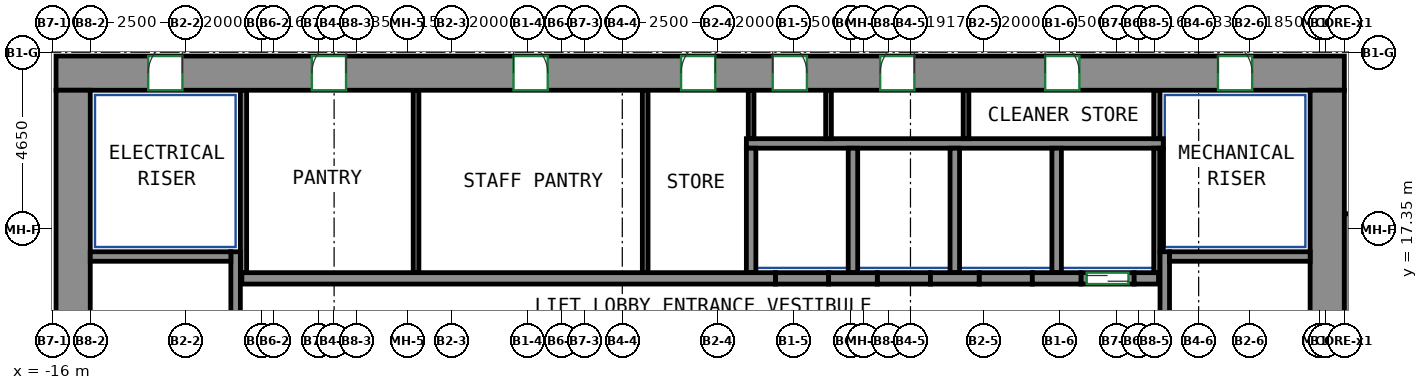
"""IFC4 building model, lengths in metres.
Left out: names, types, materials, properties, quantities, classifications, styles, units other than length and angle.
Written with IfcOpenShell. Run it as: python <this file> out.ifc"""

import sys

from ifc_helpers import new_model, si_unit, direction, frame, frame_2d, origin, place, context, subcontext, project, spatial, rectangle, extrude, source, transform, mapped, element, fill, save


model = new_model("IFC4")
c1 = context("Model", 3, precision=1e-05, world=origin(), true_north=direction((0.0, 1.0)))
c2 = subcontext(c1, "Body", "Model", "MODEL_VIEW")
j1 = project(units=[si_unit("LENGTHUNIT", "METRE"), si_unit("PLANEANGLEUNIT", "RADIAN")], contexts=[c1])
p1 = place(None, origin())
s1 = spatial("IfcSite", under=j1, at=p1, CompositionType="ELEMENT")
p2 = place(p1, origin())
s2 = spatial("IfcBuilding", under=s1, at=p2, CompositionType="ELEMENT")
p3 = place(p2, frame((0.0, 0.0, 150.7)))
s3 = spatial("IfcBuildingStorey", under=s2, at=p3, CompositionType="ELEMENT", Elevation=150.7)
m1 = source(origin(), c2, "Body", "SweptSolid", [
    extrude(rectangle(XDim=33.9, YDim=0.9, at=frame_2d((16.95, 0.0))), origin(), (0.0, 0.0, 1.0), 3.12),
])
p4 = place(p3, frame((-15.9, 21.45, 0.0), z_axis=(0.0, 0.0, 1.0), x_axis=(1.0, 0.0, 0.0)))
e1 = element("IfcWall", 1, at=p4, inside=s3, PredefinedType="SHEAR", context=c2, shape_type="MappedRepresentation", body=[
    mapped(m1, transform((0.0, 0.0, 0.0))),
])
p5 = place(p4, frame((6.731, 0.0, 0.0)))
e2 = element("IfcOpeningElement", 2, at=p5, cuts=e1, PredefinedType="OPENING", context=c2, shape_type="SweptSolid", body=[
    extrude(rectangle(XDim=0.9, YDim=2.1, at=frame_2d((0.45, 1.05))), frame((0.0, 0.46, 0.0), z_axis=(0.0, -1.0, 0.0), x_axis=(1.0, 0.0, 0.0)), (0.0, 0.0, 1.0), 0.92),
])
p6 = place(p4, frame((12.038, 0.0, 0.0)))
e3 = element("IfcOpeningElement", 3, at=p6, cuts=e1, PredefinedType="OPENING", context=c2, shape_type="SweptSolid", body=[
    extrude(rectangle(XDim=0.9, YDim=2.1, at=frame_2d((0.45, 1.05))), frame((0.0, 0.46, 0.0), z_axis=(0.0, -1.0, 0.0), x_axis=(1.0, 0.0, 0.0)), (0.0, 0.0, 1.0), 0.92),
])
p7 = place(p4, frame((16.446, 0.0, 0.0)))
e4 = element("IfcOpeningElement", 4, at=p7, cuts=e1, PredefinedType="OPENING", context=c2, shape_type="SweptSolid", body=[
    extrude(rectangle(XDim=0.9, YDim=2.1, at=frame_2d((0.45, 1.05))), frame((0.0, 0.46, 0.0), z_axis=(0.0, -1.0, 0.0), x_axis=(1.0, 0.0, 0.0)), (0.0, 0.0, 1.0), 0.92),
])
p8 = place(p4, frame((18.858, 0.0, 0.0)))
e5 = element("IfcOpeningElement", 5, at=p8, cuts=e1, PredefinedType="OPENING", context=c2, shape_type="SweptSolid", body=[
    extrude(rectangle(XDim=0.9, YDim=2.1, at=frame_2d((0.45, 1.05))), frame((0.0, 0.46, 0.0), z_axis=(0.0, -1.0, 0.0), x_axis=(1.0, 0.0, 0.0)), (0.0, 0.0, 1.0), 0.92),
])
p9 = place(p4, frame((21.686, 0.0, 0.0)))
e6 = element("IfcOpeningElement", 6, at=p9, cuts=e1, PredefinedType="OPENING", context=c2, shape_type="SweptSolid", body=[
    extrude(rectangle(XDim=0.9, YDim=2.1, at=frame_2d((0.45, 1.05))), frame((0.0, 0.46, 0.0), z_axis=(0.0, -1.0, 0.0), x_axis=(1.0, 0.0, 0.0)), (0.0, 0.0, 1.0), 0.92),
])
p10 = place(p4, frame((26.027, 0.0, 0.0)))
e7 = element("IfcOpeningElement", 7, at=p10, cuts=e1, PredefinedType="OPENING", context=c2, shape_type="SweptSolid", body=[
    extrude(rectangle(XDim=0.9, YDim=2.1, at=frame_2d((0.45, 1.05))), frame((0.0, 0.46, 0.0), z_axis=(0.0, -1.0, 0.0), x_axis=(1.0, 0.0, 0.0)), (0.0, 0.0, 1.0), 0.92),
])
p11 = place(p4, frame((2.425, 0.0, 0.0)))
e8 = element("IfcOpeningElement", 8, at=p11, cuts=e1, PredefinedType="OPENING", context=c2, shape_type="SweptSolid", body=[
    extrude(rectangle(XDim=0.9, YDim=2.1, at=frame_2d((0.45, 1.05))), frame((0.0, 0.46, 0.0), z_axis=(0.0, -1.0, 0.0), x_axis=(1.0, 0.0, 0.0)), (0.0, 0.0, 1.0), 0.92),
])
p12 = place(p4, frame((30.575, 0.0, 0.0)))
e9 = element("IfcOpeningElement", 9, at=p12, cuts=e1, PredefinedType="OPENING", context=c2, shape_type="SweptSolid", body=[
    extrude(rectangle(XDim=0.9, YDim=2.1, at=frame_2d((0.45, 1.05))), frame((0.0, 0.46, 0.0), z_axis=(0.0, -1.0, 0.0), x_axis=(1.0, 0.0, 0.0)), (0.0, 0.0, 1.0), 0.92),
])
m2 = source(origin(), c2, "Body", "SweptSolid", [
    extrude(rectangle(XDim=12.0, YDim=0.9, at=frame_2d((6.0, 0.0))), origin(), (0.0, 0.0, 1.0), 3.12),
])
for number, where, z_axis, x_axis in (
    (10, (-15.45, 9.0, 0.0), (0.0, 0.0, 1.0), (0.0, 1.0, 0.0)),
    (11, (17.55, 9.0, 0.0), (0.0, 0.0, 1.0), (0.0, 1.0, 0.0)),
):
    element("IfcWall", number, at=place(p3, frame(where, z_axis=z_axis, x_axis=x_axis)), inside=s3, PredefinedType="SHEAR", context=c2, shape_type="MappedRepresentation", body=[
        mapped(m2, transform((0.0, 0.0, 0.0))),
    ])
m3 = source(origin(), c2, "Body", "SweptSolid", [
    extrude(rectangle(XDim=7.75, YDim=0.25, at=frame_2d((3.875, 0.0))), origin(), (0.0, 0.0, 1.0), 3.12),
])
p13 = place(p3, frame((-11.175, 9.0, 0.0), z_axis=(0.0, 0.0, 1.0), x_axis=(0.0, 1.0, 0.0)))
e12 = element("IfcWall", 12, at=p13, inside=s3, PredefinedType="SHEAR", context=c2, shape_type="MappedRepresentation", body=[
    mapped(m3, transform((0.0, 0.0, 0.0))),
])
m4 = source(origin(), c2, "Body", "SweptSolid", [
    extrude(rectangle(XDim=3.7, YDim=0.25, at=frame_2d((1.85, 0.0))), origin(), (0.0, 0.0, 1.0), 3.12),
])
p14 = place(p3, frame((-15.0, 16.625, 0.0), z_axis=(0.0, 0.0, 1.0), x_axis=(1.0, 0.0, 0.0)))
e13 = element("IfcWall", 13, at=p14, inside=s3, PredefinedType="SHEAR", context=c2, shape_type="MappedRepresentation", body=[
    mapped(m4, transform((0.0, 0.0, 0.0))),
])
p15 = place(p3, frame((13.275, 9.0, 0.0), z_axis=(0.0, 0.0, 1.0), x_axis=(0.0, 1.0, 0.0)))
e14 = element("IfcWall", 14, at=p15, inside=s3, PredefinedType="SHEAR", context=c2, shape_type="MappedRepresentation", body=[
    mapped(m3, transform((0.0, 0.0, 0.0))),
])
m5 = source(origin(), c2, "Body", "SweptSolid", [
    extrude(rectangle(XDim=3.7, YDim=0.25, at=frame_2d((1.85, 0.0))), origin(), (0.0, 0.0, 1.0), 3.12),
])
p16 = place(p3, frame((13.4, 16.625, 0.0), z_axis=(0.0, 0.0, 1.0), x_axis=(1.0, 0.0, 0.0)))
e15 = element("IfcWall", 15, at=p16, inside=s3, PredefinedType="SHEAR", context=c2, shape_type="MappedRepresentation", body=[
    mapped(m5, transform((0.0, 0.0, 0.0))),
])
m6 = source(origin(), c2, "Body", "SweptSolid", [
    extrude(rectangle(XDim=8.0, YDim=0.35, at=frame_2d((4.0, 0.0))), origin(), (0.0, 0.0, 1.0), 3.12),
])
p17 = place(p3, frame((18.175, 9.75, 0.0), z_axis=(0.0, 0.0, 1.0), x_axis=(0.0, 1.0, 0.0)))
e16 = element("IfcWall", 16, at=p17, inside=s3, PredefinedType="SHEAR", context=c2, shape_type="MappedRepresentation", body=[
    mapped(m6, transform((0.0, 0.0, 0.0))),
])
m7 = source(origin(), c2, "Body", "SweptSolid", [
    extrude(rectangle(XDim=14.04, YDim=0.3, at=frame_2d((7.02, 0.0))), origin(), (0.0, 0.0, 1.0), 3.12),
])
p18 = place(p3, frame((-11.01, 16.05, 0.0), z_axis=(0.0, 0.0, 1.0), x_axis=(1.0, 0.0, 0.0)))
e17 = element("IfcWall", 17, at=p18, inside=s3, PredefinedType="SHEAR", context=c2, shape_type="MappedRepresentation", body=[
    mapped(m7, transform((0.0, 0.0, 0.0))),
])
m8 = source(origin(), c2, "Body", "SweptSolid", [
    extrude(rectangle(XDim=1.28, YDim=0.3, at=frame_2d((0.64, 0.0))), origin(), (0.0, 0.0, 1.0), 3.12),
])
p19 = place(p3, frame((4.43, 16.05, 0.0), z_axis=(0.0, 0.0, 1.0), x_axis=(1.0, 0.0, 0.0)))
e18 = element("IfcWall", 18, at=p19, inside=s3, PredefinedType="SHEAR", context=c2, shape_type="MappedRepresentation", body=[
    mapped(m8, transform((0.0, 0.0, 0.0))),
])
m9 = source(origin(), c2, "Body", "SweptSolid", [
    extrude(rectangle(XDim=1.28, YDim=0.3, at=frame_2d((0.64, 0.0))), origin(), (0.0, 0.0, 1.0), 3.12),
])
p20 = place(p3, frame((7.11, 16.05, 0.0), z_axis=(0.0, 0.0, 1.0), x_axis=(1.0, 0.0, 0.0)))
e19 = element("IfcWall", 19, at=p20, inside=s3, PredefinedType="SHEAR", context=c2, shape_type="MappedRepresentation", body=[
    mapped(m9, transform((0.0, 0.0, 0.0))),
])
p21 = place(p3, frame((9.79, 16.05, 0.0), z_axis=(0.0, 0.0, 1.0), x_axis=(1.0, 0.0, 0.0)))
e20 = element("IfcWall", 20, at=p21, inside=s3, PredefinedType="SHEAR", context=c2, shape_type="MappedRepresentation", body=[
    mapped(m8, transform((0.0, 0.0, 0.0))),
])
m10 = source(origin(), c2, "Body", "SweptSolid", [
    extrude(rectangle(XDim=0.64, YDim=0.3, at=frame_2d((0.32, 0.0))), origin(), (0.0, 0.0, 1.0), 3.12),
])
p22 = place(p3, frame((12.47, 16.05, 0.0), z_axis=(0.0, 0.0, 1.0), x_axis=(1.0, 0.0, 0.0)))
e21 = element("IfcWall", 21, at=p22, inside=s3, PredefinedType="SHEAR", context=c2, shape_type="MappedRepresentation", body=[
    mapped(m10, transform((0.0, 0.0, 0.0))),
])
m11 = source(origin(), c2, "Body", "SweptSolid", [
    extrude(rectangle(XDim=1.4, YDim=0.3, at=frame_2d((0.7, 0.0))), origin(), (0.0, 0.0, 1.0), 3.12),
])
p23 = place(p3, frame((11.07, 16.05, 0.0), z_axis=(0.0, 0.0, 1.0), x_axis=(1.0, 0.0, 0.0)))
e22 = element("IfcWall", 22, at=p23, inside=s3, PredefinedType="PARTITIONING", context=c2, shape_type="MappedRepresentation", body=[
    mapped(m11, transform((0.0, 0.0, 0.0))),
])
p24 = place(p23, frame((0.15, 0.0, 0.0)))
e23 = element("IfcOpeningElement", 23, at=p24, cuts=e22, PredefinedType="OPENING", context=c2, shape_type="SweptSolid", body=[
    extrude(rectangle(XDim=1.1, YDim=2.1, at=frame_2d((0.55, 1.05))), frame((0.0, 0.16, 0.0), z_axis=(0.0, -1.0, 0.0), x_axis=(1.0, 0.0, 0.0)), (0.0, 0.0, 1.0), 0.32),
])
p25 = place(p3, frame((3.03, 16.05, 0.0), z_axis=(0.0, 0.0, 1.0), x_axis=(1.0, 0.0, 0.0)))
e24 = element("IfcWall", 24, at=p25, inside=s3, PredefinedType="PARTITIONING", context=c2, shape_type="MappedRepresentation", body=[
    mapped(m11, transform((0.0, 0.0, 0.0))),
])
m12 = source(origin(), c2, "Body", "SweptSolid", [
    extrude(rectangle(XDim=1.4, YDim=0.3, at=frame_2d((0.7, 0.0))), origin(), (0.0, 0.0, 1.0), 3.12),
])
for number, where, z_axis, x_axis in (
    (25, (5.71, 16.05, 0.0), (0.0, 0.0, 1.0), (1.0, 0.0, 0.0)),
    (26, (8.39, 16.05, 0.0), (0.0, 0.0, 1.0), (1.0, 0.0, 0.0)),
):
    element("IfcWall", number, at=place(p3, frame(where, z_axis=z_axis, x_axis=x_axis)), inside=s3, PredefinedType="PARTITIONING", context=c2, shape_type="MappedRepresentation", body=[
        mapped(m12, transform((0.0, 0.0, 0.0))),
    ])
m13 = source(origin(), c2, "Body", "SweptSolid", [
    extrude(rectangle(XDim=10.97, YDim=0.25, at=frame_2d((5.485, 0.0))), origin(), (0.0, 0.0, 1.0), 3.12),
])
p26 = place(p3, frame((2.265, 19.6, 0.0), z_axis=(0.0, 0.0, 1.0), x_axis=(1.0, 0.0, 0.0)))
e27 = element("IfcWall", 27, at=p26, inside=s3, PredefinedType="PARTITIONING", context=c2, shape_type="MappedRepresentation", body=[
    mapped(m13, transform((0.0, 0.0, 0.0))),
])
m14 = source(origin(), c2, "Body", "SweptSolid", [
    extrude(rectangle(XDim=3.275, YDim=0.165, at=frame_2d((1.638, 0.0))), origin(), (0.0, 0.0, 1.0), 3.12),
])
p27 = place(p3, frame((13.067, 16.2, 0.0), z_axis=(0.0, 0.0, 1.0), x_axis=(0.0, 1.0, 0.0)))
e28 = element("IfcWall", 28, at=p27, inside=s3, PredefinedType="PARTITIONING", context=c2, shape_type="MappedRepresentation", body=[
    mapped(m14, transform((0.0, 0.0, 0.0))),
])
m15 = source(origin(), c2, "Body", "SweptSolid", [
    extrude(rectangle(XDim=1.275, YDim=0.165, at=frame_2d((0.637, 0.0))), origin(), (0.0, 0.0, 1.0), 3.12),
])
p28 = place(p3, frame((13.067, 19.725, 0.0), z_axis=(0.0, 0.0, 1.0), x_axis=(0.0, 1.0, 0.0)))
e29 = element("IfcWall", 29, at=p28, inside=s3, PredefinedType="PARTITIONING", context=c2, shape_type="MappedRepresentation", body=[
    mapped(m15, transform((0.0, 0.0, 0.0))),
])
m16 = source(origin(), c2, "Body", "SweptSolid", [
    extrude(rectangle(XDim=4.8, YDim=0.165, at=frame_2d((2.4, 0.0))), origin(), (0.0, 0.0, 1.0), 3.12),
])
p29 = place(p3, frame((-10.968, 16.2, 0.0), z_axis=(0.0, 0.0, 1.0), x_axis=(0.0, 1.0, 0.0)))
e30 = element("IfcWall", 30, at=p29, inside=s3, PredefinedType="PARTITIONING", context=c2, shape_type="MappedRepresentation", body=[
    mapped(m16, transform((0.0, 0.0, 0.0))),
])
m17 = source(origin(), c2, "Body", "SweptSolid", [
    extrude(rectangle(XDim=3.275, YDim=0.25, at=frame_2d((1.638, 0.0))), origin(), (0.0, 0.0, 1.0), 3.12),
])
p30 = place(p3, frame((10.43, 16.2, 0.0), z_axis=(0.0, 0.0, 1.0), x_axis=(0.0, 1.0, 0.0)))
e31 = element("IfcWall", 31, at=p30, inside=s3, PredefinedType="PARTITIONING", context=c2, shape_type="MappedRepresentation", body=[
    mapped(m17, transform((0.0, 0.0, 0.0))),
])
m18 = source(origin(), c2, "Body", "SweptSolid", [
    extrude(rectangle(XDim=2.725, YDim=0.085, at=frame_2d((1.363, 0.0))), origin(), (0.0, 0.0, 1.0), 3.12),
])
p31 = place(p3, frame((13.192, 16.75, 0.0), z_axis=(0.0, 0.0, 1.0), x_axis=(0.0, 1.0, 0.0)))
e32 = element("IfcWall", 32, at=p31, inside=s3, PredefinedType="PARTITIONING", context=c2, shape_type="MappedRepresentation", body=[
    mapped(m18, transform((0.0, 0.0, 0.0))),
])
for number, where, z_axis, x_axis in (
    (33, (2.39, 16.2, 0.0), (0.0, 0.0, 1.0), (0.0, 1.0, 0.0)),
    (34, (5.07, 16.2, 0.0), (0.0, 0.0, 1.0), (0.0, 1.0, 0.0)),
    (35, (7.75, 16.2, 0.0), (0.0, 0.0, 1.0), (0.0, 1.0, 0.0)),
):
    element("IfcWall", number, at=place(p3, frame(where, z_axis=z_axis, x_axis=x_axis)), inside=s3, PredefinedType="PARTITIONING", context=c2, shape_type="MappedRepresentation", body=[
        mapped(m17, transform((0.0, 0.0, 0.0))),
    ])
m19 = source(origin(), c2, "Body", "SweptSolid", [
    extrude(rectangle(XDim=4.8, YDim=0.15, at=frame_2d((2.4, 0.0))), origin(), (0.0, 0.0, 1.0), 3.12),
])
for number, where, z_axis, x_axis in (
    (36, (-6.427, 16.2, 0.0), (0.0, 0.0, 1.0), (0.0, 1.0, 0.0)),
    (37, (-0.397, 16.2, 0.0), (0.0, 0.0, 1.0), (0.0, 1.0, 0.0)),
):
    element("IfcWall", number, at=place(p3, frame(where, z_axis=z_axis, x_axis=x_axis)), inside=s3, PredefinedType="PARTITIONING", context=c2, shape_type="MappedRepresentation", body=[
        mapped(m19, transform((0.0, 0.0, 0.0))),
    ])
m20 = source(origin(), c2, "Body", "SweptSolid", [
    extrude(rectangle(XDim=1.275, YDim=0.15, at=frame_2d((0.637, 0.0))), origin(), (0.0, 0.0, 1.0), 3.12),
])
for number, where, z_axis, x_axis in (
    (38, (2.39, 19.725, 0.0), (0.0, 0.0, 1.0), (0.0, 1.0, 0.0)),
    (39, (4.427, 19.725, 0.0), (0.0, 0.0, 1.0), (0.0, 1.0, 0.0)),
    (40, (8.045, 19.725, 0.0), (0.0, 0.0, 1.0), (0.0, 1.0, 0.0)),
):
    element("IfcWall", number, at=place(p3, frame(where, z_axis=z_axis, x_axis=x_axis)), inside=s3, PredefinedType="PARTITIONING", context=c2, shape_type="MappedRepresentation", body=[
        mapped(m20, transform((0.0, 0.0, 0.0))),
    ])
p32 = place(p24, origin())
e41 = element("IfcDoor", 41, at=p32, inside=s3, OperationType="DOUBLE_DOOR_SLIDING", PredefinedType="DOOR", context=c2, shape_type="SweptSolid", body=[
    extrude(rectangle(XDim=1.1, YDim=2.1, at=frame_2d((0.55, 1.05))), frame((0.0, 0.025, 0.0), z_axis=(0.0, -1.0, 0.0), x_axis=(1.0, 0.0, 0.0)), (0.0, 0.0, 1.0), 0.05),
])
fill(e23, e41)
p33 = place(p5, origin())
e42 = element("IfcDoor", 42, at=p33, inside=s3, OperationType="SINGLE_SWING_RIGHT", PredefinedType="DOOR", context=c2, shape_type="SweptSolid", body=[
    extrude(rectangle(XDim=0.9, YDim=2.1, at=frame_2d((0.45, 1.05))), frame((0.0, -0.305, 0.0), z_axis=(0.0, -1.0, 0.0), x_axis=(1.0, 0.0, 0.0)), (0.0, 0.0, 1.0), 0.05),
])
fill(e2, e42)
p34 = place(p6, origin())
e43 = element("IfcDoor", 43, at=p34, inside=s3, OperationType="SINGLE_SWING_LEFT", PredefinedType="DOOR", context=c2, shape_type="SweptSolid", body=[
    extrude(rectangle(XDim=0.9, YDim=2.1, at=frame_2d((0.45, 1.05))), frame((0.0, -0.305, 0.0), z_axis=(0.0, -1.0, 0.0), x_axis=(1.0, 0.0, 0.0)), (0.0, 0.0, 1.0), 0.05),
])
fill(e3, e43)
p35 = place(p7, origin())
e44 = element("IfcDoor", 44, at=p35, inside=s3, OperationType="SINGLE_SWING_RIGHT", PredefinedType="DOOR", context=c2, shape_type="SweptSolid", body=[
    extrude(rectangle(XDim=0.9, YDim=2.1, at=frame_2d((0.45, 1.05))), frame((0.0, -0.305, 0.0), z_axis=(0.0, -1.0, 0.0), x_axis=(1.0, 0.0, 0.0)), (0.0, 0.0, 1.0), 0.05),
])
fill(e4, e44)
p36 = place(p8, origin())
e45 = element("IfcDoor", 45, at=p36, inside=s3, OperationType="SINGLE_SWING_LEFT", PredefinedType="DOOR", context=c2, shape_type="SweptSolid", body=[
    extrude(rectangle(XDim=0.9, YDim=2.1, at=frame_2d((0.45, 1.05))), frame((0.0, -0.305, 0.0), z_axis=(0.0, -1.0, 0.0), x_axis=(1.0, 0.0, 0.0)), (0.0, 0.0, 1.0), 0.05),
])
fill(e5, e45)
p37 = place(p9, origin())
e46 = element("IfcDoor", 46, at=p37, inside=s3, OperationType="SINGLE_SWING_RIGHT", PredefinedType="DOOR", context=c2, shape_type="SweptSolid", body=[
    extrude(rectangle(XDim=0.9, YDim=2.1, at=frame_2d((0.45, 1.05))), frame((0.0, -0.305, 0.0), z_axis=(0.0, -1.0, 0.0), x_axis=(1.0, 0.0, 0.0)), (0.0, 0.0, 1.0), 0.05),
])
fill(e6, e46)
p38 = place(p10, origin())
e47 = element("IfcDoor", 47, at=p38, inside=s3, OperationType="SINGLE_SWING_LEFT", PredefinedType="DOOR", context=c2, shape_type="SweptSolid", body=[
    extrude(rectangle(XDim=0.9, YDim=2.1, at=frame_2d((0.45, 1.05))), frame((0.0, -0.305, 0.0), z_axis=(0.0, -1.0, 0.0), x_axis=(1.0, 0.0, 0.0)), (0.0, 0.0, 1.0), 0.05),
])
fill(e7, e47)
p39 = place(p11, origin())
e48 = element("IfcDoor", 48, at=p39, inside=s3, OperationType="SINGLE_SWING_RIGHT", PredefinedType="DOOR", context=c2, shape_type="SweptSolid", body=[
    extrude(rectangle(XDim=0.9, YDim=2.1, at=frame_2d((0.45, 1.05))), frame((0.0, -0.305, 0.0), z_axis=(0.0, -1.0, 0.0), x_axis=(1.0, 0.0, 0.0)), (0.0, 0.0, 1.0), 0.05),
])
fill(e8, e48)
p40 = place(p12, origin())
e49 = element("IfcDoor", 49, at=p40, inside=s3, OperationType="SINGLE_SWING_LEFT", PredefinedType="DOOR", context=c2, shape_type="SweptSolid", body=[
    extrude(rectangle(XDim=0.9, YDim=2.1, at=frame_2d((0.45, 1.05))), frame((0.0, -0.305, 0.0), z_axis=(0.0, -1.0, 0.0), x_axis=(1.0, 0.0, 0.0)), (0.0, 0.0, 1.0), 0.05),
])
fill(e9, e49)
save(model, sys.argv[1])
